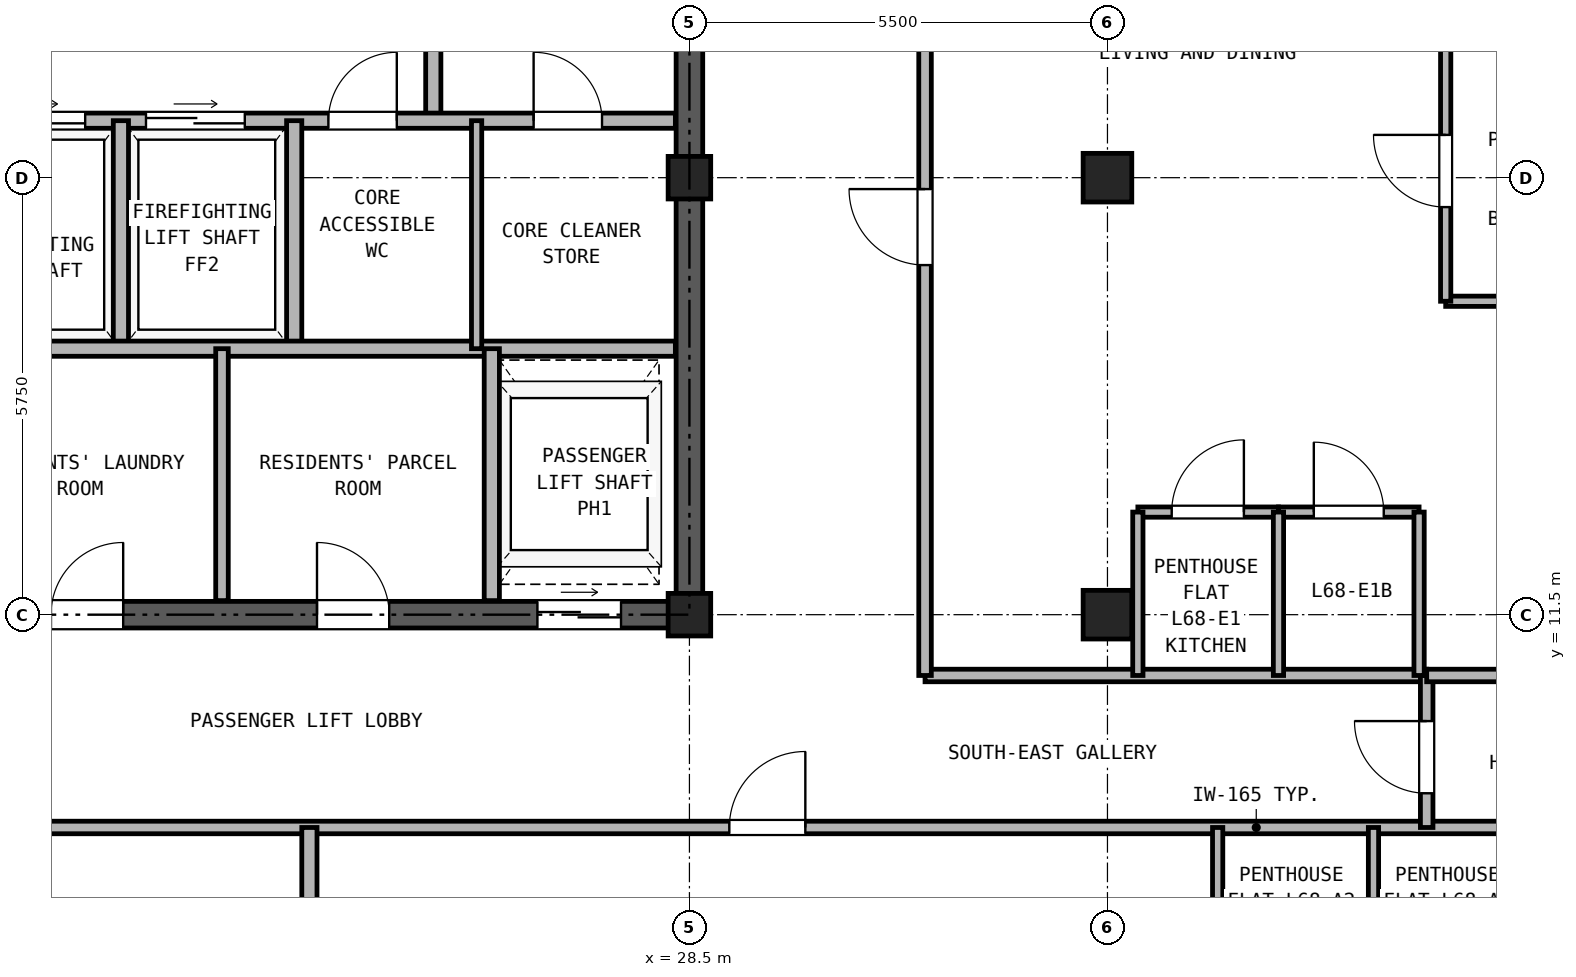
"""IFC4 building model, lengths in metres.
Left out: names, types, materials, properties, quantities, classifications, styles, units other than length and angle.
Written with IfcOpenShell. Run it as: python <this file> out.ifc"""

import sys

from ifc_helpers import new_model, si_unit, direction, frame, frame_2d, origin, origin_2d, place, context, subcontext, project, spatial, rectangle, hollow_rectangle, extrude, source, transform, mapped, element, fill, save


model = new_model("IFC4")
c1 = context("Model", 3, precision=1e-05, world=origin(), true_north=direction((0.0, 1.0)))
c2 = subcontext(c1, "Body", "Model", "MODEL_VIEW")
j1 = project(units=[si_unit("LENGTHUNIT", "METRE"), si_unit("PLANEANGLEUNIT", "RADIAN")], contexts=[c1])
p1 = place(None, origin())
s1 = spatial("IfcSite", under=j1, at=p1, CompositionType="ELEMENT")
p2 = place(p1, origin())
s2 = spatial("IfcBuilding", under=s1, at=p2, CompositionType="ELEMENT")
p3 = place(p2, frame((0.0, 0.0, 239.3)))
s3 = spatial("IfcBuildingStorey", under=s2, at=p3, CompositionType="ELEMENT", Elevation=239.3)
m1 = source(origin(), c2, "Body", "SweptSolid", [
    extrude(hollow_rectangle(XDim=0.56, YDim=0.56, WallThickness=0.03, at=origin_2d()), origin(), (0.0, 0.0, 1.0), 2.98),
])
for number, where, z_axis, x_axis in (
    (1, (28.5, 11.5, 0.0), (0.0, 0.0, 1.0), (1.0, 0.0, 0.0)),
    (2, (28.5, 17.25, 0.0), (0.0, 0.0, 1.0), (1.0, 0.0, 0.0)),
):
    element("IfcColumn", number, at=place(p3, frame(where, z_axis=z_axis, x_axis=x_axis)), inside=s3, PredefinedType="COLUMN", context=c2, shape_type="MappedRepresentation", body=[
        mapped(m1, transform((0.0, 0.0, 0.0), x_axis=(1.0, 0.0, 0.0), y_axis=(0.0, 1.0, 0.0), z_axis=(0.0, 0.0, 1.0), scale=1.0)),
    ])
m2 = source(origin(), c2, "Body", "SweptSolid", [
    extrude(hollow_rectangle(XDim=0.64, YDim=0.64, WallThickness=0.035, at=origin_2d()), origin(), (0.0, 0.0, 1.0), 2.98),
])
for number, where, z_axis, x_axis in (
    (3, (34.0, 11.5, 0.0), (0.0, 0.0, 1.0), (1.0, 0.0, 0.0)),
    (4, (34.0, 17.25, 0.0), (0.0, 0.0, 1.0), (1.0, 0.0, 0.0)),
):
    element("IfcColumn", number, at=place(p3, frame(where, z_axis=z_axis, x_axis=x_axis)), inside=s3, PredefinedType="COLUMN", context=c2, shape_type="MappedRepresentation", body=[
        mapped(m2, transform((0.0, 0.0, 0.0), x_axis=(1.0, 0.0, 0.0), y_axis=(0.0, 1.0, 0.0), z_axis=(0.0, 0.0, 1.0), scale=1.0)),
    ])
p4 = place(p3, frame((18.325, 11.5, 0.0), z_axis=(0.0, 0.0, 1.0), x_axis=(1.0, 0.0, 0.0)))
e5 = element("IfcWall", 5, at=p4, inside=s3, PredefinedType="SHEAR", context=c2, shape_type="SweptSolid", body=[
    extrude(rectangle(XDim=10.35, YDim=0.35, at=frame_2d((5.175, 0.0))), origin(), (0.0, 0.0, 1.0), 2.98),
])
p5 = place(p4, frame((1.775, 0.0, 0.0)))
e6 = element("IfcOpeningElement", 6, at=p5, cuts=e5, PredefinedType="OPENING", context=c2, shape_type="SweptSolid", body=[
    extrude(rectangle(XDim=0.95, YDim=2.15, at=frame_2d((0.475, 1.075))), frame((0.0, 0.185, 0.0), z_axis=(0.0, -1.0, 0.0), x_axis=(1.0, 0.0, 0.0)), (0.0, 0.0, 1.0), 0.37),
])
p6 = place(p4, frame((5.275, 0.0, 0.0)))
e7 = element("IfcOpeningElement", 7, at=p6, cuts=e5, PredefinedType="OPENING", context=c2, shape_type="SweptSolid", body=[
    extrude(rectangle(XDim=0.95, YDim=2.15, at=frame_2d((0.475, 1.075))), frame((0.0, 0.185, 0.0), z_axis=(0.0, -1.0, 0.0), x_axis=(1.0, 0.0, 0.0)), (0.0, 0.0, 1.0), 0.37),
])
p7 = place(p4, frame((8.175, 0.0, 0.0)))
e8 = element("IfcOpeningElement", 8, at=p7, cuts=e5, PredefinedType="OPENING", context=c2, shape_type="SweptSolid", body=[
    extrude(rectangle(XDim=1.1, YDim=2.25, at=frame_2d((0.55, 1.125))), frame((0.0, 0.185, 0.0), z_axis=(0.0, -1.0, 0.0), x_axis=(1.0, 0.0, 0.0)), (0.0, 0.0, 1.0), 0.37),
])
p8 = place(p3, frame((28.5, 11.675, 0.0), z_axis=(0.0, 0.0, 1.0), x_axis=(0.0, 1.0, 0.0)))
e9 = element("IfcWall", 9, at=p8, inside=s3, PredefinedType="SHEAR", context=c2, shape_type="SweptSolid", body=[
    extrude(rectangle(XDim=16.9, YDim=0.35, at=frame_2d((8.45, 0.0))), origin(), (0.0, 0.0, 1.0), 2.98),
])
p9 = place(p8, frame((7.475, 0.0, 0.0)))
e10 = element("IfcOpeningElement", 10, at=p9, cuts=e9, PredefinedType="OPENING", context=c2, shape_type="SweptSolid", body=[
    extrude(rectangle(XDim=1.15, YDim=2.2, at=frame_2d((0.575, 1.1))), frame((0.0, 0.185, 0.0), z_axis=(0.0, -1.0, 0.0), x_axis=(1.0, 0.0, 0.0)), (0.0, 0.0, 1.0), 0.37),
])
p10 = place(p3, frame((25.13, 18.0, 0.0), z_axis=(0.0, 0.0, 1.0), x_axis=(0.0, 1.0, 0.0)))
e11 = element("IfcWall", 11, at=p10, inside=s3, PredefinedType="PARTITIONING", context=c2, shape_type="SweptSolid", body=[
    extrude(rectangle(XDim=3.39, YDim=0.2, at=frame_2d((1.695, 0.0))), origin(), (0.0, 0.0, 1.0), 2.98),
])
p11 = place(p10, frame((1.1, 0.0, 0.0)))
e12 = element("IfcOpeningElement", 12, at=p11, cuts=e11, PredefinedType="OPENING", context=c2, shape_type="SweptSolid", body=[
    extrude(rectangle(XDim=1.15, YDim=2.2, at=frame_2d((0.575, 1.1))), frame((0.0, 0.11, 0.0), z_axis=(0.0, -1.0, 0.0), x_axis=(1.0, 0.0, 0.0)), (0.0, 0.0, 1.0), 0.22),
])
p12 = place(p3, frame((18.685, 18.0, 0.0), z_axis=(0.0, 0.0, 1.0), x_axis=(1.0, 0.0, 0.0)))
e13 = element("IfcWall", 13, at=p12, inside=s3, PredefinedType="PARTITIONING", context=c2, shape_type="SweptSolid", body=[
    extrude(rectangle(XDim=9.63, YDim=0.2, at=frame_2d((4.815, 0.0))), origin(), (0.0, 0.0, 1.0), 2.98),
])
p13 = place(p12, frame((0.565, 0.0, 0.0)))
e14 = element("IfcOpeningElement", 14, at=p13, cuts=e13, PredefinedType="OPENING", context=c2, shape_type="SweptSolid", body=[
    extrude(rectangle(XDim=1.3, YDim=2.3, at=frame_2d((0.65, 1.15))), frame((0.0, 0.11, 0.0), z_axis=(0.0, -1.0, 0.0), x_axis=(1.0, 0.0, 0.0)), (0.0, 0.0, 1.0), 0.22),
])
p14 = place(p12, frame((2.665, 0.0, 0.0)))
e15 = element("IfcOpeningElement", 15, at=p14, cuts=e13, PredefinedType="OPENING", context=c2, shape_type="SweptSolid", body=[
    extrude(rectangle(XDim=1.3, YDim=2.3, at=frame_2d((0.65, 1.15))), frame((0.0, 0.11, 0.0), z_axis=(0.0, -1.0, 0.0), x_axis=(1.0, 0.0, 0.0)), (0.0, 0.0, 1.0), 0.22),
])
p15 = place(p12, frame((5.065, 0.0, 0.0)))
e16 = element("IfcOpeningElement", 16, at=p15, cuts=e13, PredefinedType="OPENING", context=c2, shape_type="SweptSolid", body=[
    extrude(rectangle(XDim=0.9, YDim=2.05, at=frame_2d((0.45, 1.025))), frame((0.0, 0.11, 0.0), z_axis=(0.0, -1.0, 0.0), x_axis=(1.0, 0.0, 0.0)), (0.0, 0.0, 1.0), 0.22),
])
p16 = place(p12, frame((7.765, 0.0, 0.0)))
e17 = element("IfcOpeningElement", 17, at=p16, cuts=e13, PredefinedType="OPENING", context=c2, shape_type="SweptSolid", body=[
    extrude(rectangle(XDim=0.9, YDim=2.05, at=frame_2d((0.45, 1.025))), frame((0.0, 0.11, 0.0), z_axis=(0.0, -1.0, 0.0), x_axis=(1.0, 0.0, 0.0)), (0.0, 0.0, 1.0), 0.22),
])
for number, where, z_axis, x_axis in (
    (18, (21.02, 15.0, 0.0), (0.0, 0.0, 1.0), (0.0, 1.0, 0.0)),
    (19, (23.3, 15.0, 0.0), (0.0, 0.0, 1.0), (0.0, 1.0, 0.0)),
):
    element("IfcWall", number, at=place(p3, frame(where, z_axis=z_axis, x_axis=x_axis)), inside=s3, PredefinedType="PARTITIONING", context=c2, shape_type="SweptSolid", body=[
        extrude(rectangle(XDim=3.0, YDim=0.2, at=frame_2d((1.5, 0.0))), origin(), (0.0, 0.0, 1.0), 2.98),
    ])
p17 = place(p3, frame((18.685, 15.0, 0.0), z_axis=(0.0, 0.0, 1.0), x_axis=(1.0, 0.0, 0.0)))
e20 = element("IfcWall", 20, at=p17, inside=s3, PredefinedType="PARTITIONING", context=c2, shape_type="SweptSolid", body=[
    extrude(rectangle(XDim=9.63, YDim=0.2, at=frame_2d((4.815, 0.0))), origin(), (0.0, 0.0, 1.0), 2.98),
])
p18 = place(p3, frame((25.7, 15.0, 0.0), z_axis=(0.0, 0.0, 1.0), x_axis=(0.0, 1.0, 0.0)))
e21 = element("IfcWall", 21, at=p18, inside=s3, PredefinedType="PARTITIONING", context=c2, shape_type="SweptSolid", body=[
    extrude(rectangle(XDim=3.0, YDim=0.135, at=frame_2d((1.5, 0.0))), origin(), (0.0, 0.0, 1.0), 2.98),
])
p19 = place(p3, frame((22.35, 11.685, 0.0), z_axis=(0.0, 0.0, 1.0), x_axis=(0.0, 1.0, 0.0)))
e22 = element("IfcWall", 22, at=p19, inside=s3, PredefinedType="PARTITIONING", context=c2, shape_type="SweptSolid", body=[
    extrude(rectangle(XDim=3.315, YDim=0.165, at=frame_2d((1.657, 0.0))), origin(), (0.0, 0.0, 1.0), 2.98),
])
p20 = place(p3, frame((25.9, 11.685, 0.0), z_axis=(0.0, 0.0, 1.0), x_axis=(0.0, 1.0, 0.0)))
e23 = element("IfcWall", 23, at=p20, inside=s3, PredefinedType="PARTITIONING", context=c2, shape_type="SweptSolid", body=[
    extrude(rectangle(XDim=3.315, YDim=0.2, at=frame_2d((1.657, 0.0))), origin(), (0.0, 0.0, 1.0), 2.98),
])
p21 = place(p3, frame((5.36, 8.7, 0.0), z_axis=(0.0, 0.0, 1.0), x_axis=(1.0, 0.0, 0.0)))
e24 = element("IfcWall", 24, at=p21, inside=s3, PredefinedType="PARTITIONING", context=c2, shape_type="SweptSolid", body=[
    extrude(rectangle(XDim=36.28, YDim=0.165, at=frame_2d((18.14, 0.0))), origin(), (0.0, 0.0, 1.0), 2.655),
])
p22 = place(p21, frame((11.615, 0.0, 0.0)))
e25 = element("IfcOpeningElement", 25, at=p22, cuts=e24, PredefinedType="OPENING", context=c2, shape_type="SweptSolid", body=[
    extrude(rectangle(XDim=1.0, YDim=2.15, at=frame_2d((0.5, 1.075))), frame((0.0, 0.093, 0.0), z_axis=(0.0, -1.0, 0.0), x_axis=(1.0, 0.0, 0.0)), (0.0, 0.0, 1.0), 0.185),
])
p23 = place(p21, frame((23.665, 0.0, 0.0)))
e26 = element("IfcOpeningElement", 26, at=p23, cuts=e24, PredefinedType="OPENING", context=c2, shape_type="SweptSolid", body=[
    extrude(rectangle(XDim=1.0, YDim=2.15, at=frame_2d((0.5, 1.075))), frame((0.0, 0.093, 0.0), z_axis=(0.0, -1.0, 0.0), x_axis=(1.0, 0.0, 0.0)), (0.0, 0.0, 1.0), 0.185),
])
p24 = place(p3, frame((31.6, 10.7, 0.0), z_axis=(0.0, 0.0, 1.0), x_axis=(1.0, 0.0, 0.0)))
e27 = element("IfcWall", 27, at=p24, inside=s3, PredefinedType="PARTITIONING", context=c2, shape_type="SweptSolid", body=[
    extrude(rectangle(XDim=6.6, YDim=0.165, at=frame_2d((3.3, 0.0))), origin(), (0.0, 0.0, 1.0), 2.98),
])
p25 = place(p3, frame((38.2, 8.7, 0.0), z_axis=(0.0, 0.0, 1.0), x_axis=(0.0, 1.0, 0.0)))
e28 = element("IfcWall", 28, at=p25, inside=s3, PredefinedType="PARTITIONING", context=c2, shape_type="SweptSolid", body=[
    extrude(rectangle(XDim=2.0, YDim=0.165, at=frame_2d((1.0, 0.0))), origin(), (0.0, 0.0, 1.0), 2.98),
])
p26 = place(p25, frame((0.45, 0.0, 0.0)))
e29 = element("IfcOpeningElement", 29, at=p26, cuts=e28, PredefinedType="OPENING", context=c2, shape_type="SweptSolid", body=[
    extrude(rectangle(XDim=0.95, YDim=2.15, at=frame_2d((0.475, 1.075))), frame((0.0, 0.093, 0.0), z_axis=(0.0, -1.0, 0.0), x_axis=(1.0, 0.0, 0.0)), (0.0, 0.0, 1.0), 0.185),
])
p27 = place(p3, frame((31.6, 10.7, 0.0), z_axis=(0.0, 0.0, 1.0), x_axis=(0.0, 1.0, 0.0)))
e30 = element("IfcWall", 30, at=p27, inside=s3, PredefinedType="PARTITIONING", context=c2, shape_type="SweptSolid", body=[
    extrude(rectangle(XDim=24.44, YDim=0.165, at=frame_2d((12.22, 0.0))), origin(), (0.0, 0.0, 1.0), 2.98),
])
p28 = place(p27, frame((5.4, 0.0, 0.0)))
e31 = element("IfcOpeningElement", 31, at=p28, cuts=e30, PredefinedType="OPENING", context=c2, shape_type="SweptSolid", body=[
    extrude(rectangle(XDim=1.0, YDim=2.15, at=frame_2d((0.5, 1.075))), frame((0.0, 0.093, 0.0), z_axis=(0.0, -1.0, 0.0), x_axis=(1.0, 0.0, 0.0)), (0.0, 0.0, 1.0), 0.185),
])
p29 = place(p27, frame((15.7, 0.0, 0.0)))
e32 = element("IfcOpeningElement", 32, at=p29, cuts=e30, PredefinedType="OPENING", context=c2, shape_type="SweptSolid", body=[
    extrude(rectangle(XDim=1.0, YDim=2.15, at=frame_2d((0.5, 1.075))), frame((0.0, 0.093, 0.0), z_axis=(0.0, -1.0, 0.0), x_axis=(1.0, 0.0, 0.0)), (0.0, 0.0, 1.0), 0.185),
])
p30 = place(p3, frame((23.5, 0.16, 0.0), z_axis=(0.0, 0.0, 1.0), x_axis=(0.0, 1.0, 0.0)))
e33 = element("IfcWall", 33, at=p30, inside=s3, PredefinedType="PARTITIONING", context=c2, shape_type="SweptSolid", body=[
    extrude(rectangle(XDim=8.54, YDim=0.2, at=frame_2d((4.27, 0.0))), origin(), (0.0, 0.0, 1.0), 2.98),
])
for number, where, z_axis, x_axis in (
    (34, (35.45, 6.55, 0.0), (0.0, 0.0, 1.0), (0.0, 1.0, 0.0)),
    (35, (37.5, 6.55, 0.0), (0.0, 0.0, 1.0), (0.0, 1.0, 0.0)),
):
    element("IfcWall", number, at=place(p3, frame(where, z_axis=z_axis, x_axis=x_axis)), inside=s3, PredefinedType="PARTITIONING", context=c2, shape_type="SweptSolid", body=[
        extrude(rectangle(XDim=2.15, YDim=0.135, at=frame_2d((1.075, 0.0))), origin(), (0.0, 0.0, 1.0), 2.98),
    ])
p31 = place(p3, frame((38.2, 10.7, 0.0), z_axis=(0.0, 0.0, 1.0), x_axis=(1.0, 0.0, 0.0)))
e36 = element("IfcWall", 36, at=p31, inside=s3, PredefinedType="PARTITIONING", context=c2, shape_type="SweptSolid", body=[
    extrude(rectangle(XDim=3.44, YDim=0.165, at=frame_2d((1.72, 0.0))), origin(), (0.0, 0.0, 1.0), 2.98),
])
p32 = place(p3, frame((34.4, 12.85, 0.0), z_axis=(0.0, 0.0, 1.0), x_axis=(1.0, 0.0, 0.0)))
e37 = element("IfcWall", 37, at=p32, inside=s3, PredefinedType="PARTITIONING", context=c2, shape_type="SweptSolid", body=[
    extrude(rectangle(XDim=1.85, YDim=0.135, at=frame_2d((0.925, 0.0))), origin(), (0.0, 0.0, 1.0), 2.98),
])
p33 = place(p32, frame((0.445, 0.0, 0.0)))
e38 = element("IfcOpeningElement", 38, at=p33, cuts=e37, PredefinedType="OPENING", context=c2, shape_type="SweptSolid", body=[
    extrude(rectangle(XDim=0.95, YDim=2.15, at=frame_2d((0.475, 1.075))), frame((0.0, 0.077, 0.0), z_axis=(0.0, -1.0, 0.0), x_axis=(1.0, 0.0, 0.0)), (0.0, 0.0, 1.0), 0.155),
])
p34 = place(p3, frame((36.25, 12.85, 0.0), z_axis=(0.0, 0.0, 1.0), x_axis=(1.0, 0.0, 0.0)))
e39 = element("IfcWall", 39, at=p34, inside=s3, PredefinedType="PARTITIONING", context=c2, shape_type="SweptSolid", body=[
    extrude(rectangle(XDim=1.85, YDim=0.135, at=frame_2d((0.925, 0.0))), origin(), (0.0, 0.0, 1.0), 2.98),
])
p35 = place(p34, frame((0.465, 0.0, 0.0)))
e40 = element("IfcOpeningElement", 40, at=p35, cuts=e39, PredefinedType="OPENING", context=c2, shape_type="SweptSolid", body=[
    extrude(rectangle(XDim=0.92, YDim=2.1, at=frame_2d((0.46, 1.05))), frame((0.0, 0.077, 0.0), z_axis=(0.0, -1.0, 0.0), x_axis=(1.0, 0.0, 0.0)), (0.0, 0.0, 1.0), 0.155),
])
for number, where, z_axis, x_axis in (
    (41, (34.4, 10.7, 0.0), (0.0, 0.0, 1.0), (0.0, 1.0, 0.0)),
    (42, (36.25, 10.7, 0.0), (0.0, 0.0, 1.0), (0.0, 1.0, 0.0)),
    (43, (38.1, 10.7, 0.0), (0.0, 0.0, 1.0), (0.0, 1.0, 0.0)),
):
    element("IfcWall", number, at=place(p3, frame(where, z_axis=z_axis, x_axis=x_axis)), inside=s3, PredefinedType="PARTITIONING", context=c2, shape_type="SweptSolid", body=[
        extrude(rectangle(XDim=2.15, YDim=0.135, at=frame_2d((1.075, 0.0))), origin(), (0.0, 0.0, 1.0), 2.98),
    ])
p36 = place(p3, frame((38.45, 15.624, 0.0), z_axis=(0.0, 0.0, 1.0), x_axis=(1.0, 0.0, 0.0)))
e44 = element("IfcWall", 44, at=p36, inside=s3, PredefinedType="PARTITIONING", context=c2, shape_type="SweptSolid", body=[
    extrude(rectangle(XDim=3.19, YDim=0.135, at=frame_2d((1.595, 0.0))), origin(), (0.0, 0.0, 1.0), 2.98),
])
p37 = place(p3, frame((38.45, 15.624, 0.0), z_axis=(0.0, 0.0, 1.0), x_axis=(0.0, 1.0, 0.0)))
e45 = element("IfcWall", 45, at=p37, inside=s3, PredefinedType="PARTITIONING", context=c2, shape_type="SweptSolid", body=[
    extrude(rectangle(XDim=3.438, YDim=0.135, at=frame_2d((1.719, 0.0))), origin(), (0.0, 0.0, 1.0), 2.98),
])
p38 = place(p37, frame((1.239, 0.0, 0.0)))
e46 = element("IfcOpeningElement", 46, at=p38, cuts=e45, PredefinedType="OPENING", context=c2, shape_type="SweptSolid", body=[
    extrude(rectangle(XDim=0.95, YDim=2.15, at=frame_2d((0.475, 1.075))), frame((0.0, 0.077, 0.0), z_axis=(0.0, -1.0, 0.0), x_axis=(1.0, 0.0, 0.0)), (0.0, 0.0, 1.0), 0.155),
])
p39 = place(p13, origin())
e47 = element("IfcDoor", 47, at=p39, inside=s3, OperationType="DOUBLE_DOOR_SLIDING", PredefinedType="DOOR", context=c2, shape_type="SweptSolid", body=[
    extrude(rectangle(XDim=1.3, YDim=2.3, at=frame_2d((0.65, 1.15))), frame((0.0, 0.025, 0.0), z_axis=(0.0, -1.0, 0.0), x_axis=(1.0, 0.0, 0.0)), (0.0, 0.0, 1.0), 0.05),
])
fill(e14, e47)
p40 = place(p14, origin())
e48 = element("IfcDoor", 48, at=p40, inside=s3, OperationType="DOUBLE_DOOR_SLIDING", PredefinedType="DOOR", context=c2, shape_type="SweptSolid", body=[
    extrude(rectangle(XDim=1.3, YDim=2.3, at=frame_2d((0.65, 1.15))), frame((0.0, 0.025, 0.0), z_axis=(0.0, -1.0, 0.0), x_axis=(1.0, 0.0, 0.0)), (0.0, 0.0, 1.0), 0.05),
])
fill(e15, e48)
p41 = place(p15, frame((0.9, 0.0, 0.0), z_axis=(0.0, 0.0, 1.0), x_axis=(-1.0, 0.0, 0.0)))
e49 = element("IfcDoor", 49, at=p41, inside=s3, OperationType="SINGLE_SWING_RIGHT", PredefinedType="DOOR", context=c2, shape_type="SweptSolid", body=[
    extrude(rectangle(XDim=0.9, YDim=2.05, at=frame_2d((0.45, 1.025))), frame((0.0, 0.025, 0.0), z_axis=(0.0, -1.0, 0.0), x_axis=(1.0, 0.0, 0.0)), (0.0, 0.0, 1.0), 0.05),
])
fill(e16, e49)
p42 = place(p16, frame((0.9, 0.0, 0.0), z_axis=(0.0, 0.0, 1.0), x_axis=(-1.0, 0.0, 0.0)))
e50 = element("IfcDoor", 50, at=p42, inside=s3, OperationType="SINGLE_SWING_LEFT", PredefinedType="DOOR", context=c2, shape_type="SweptSolid", body=[
    extrude(rectangle(XDim=0.9, YDim=2.05, at=frame_2d((0.45, 1.025))), frame((0.0, 0.025, 0.0), z_axis=(0.0, -1.0, 0.0), x_axis=(1.0, 0.0, 0.0)), (0.0, 0.0, 1.0), 0.05),
])
fill(e17, e50)
p43 = place(p5, frame((0.95, 0.0, 0.0), z_axis=(0.0, 0.0, 1.0), x_axis=(-1.0, 0.0, 0.0)))
e51 = element("IfcDoor", 51, at=p43, inside=s3, OperationType="SINGLE_SWING_RIGHT", PredefinedType="DOOR", context=c2, shape_type="SweptSolid", body=[
    extrude(rectangle(XDim=0.95, YDim=2.15, at=frame_2d((0.475, 1.075))), frame((0.0, 0.025, 0.0), z_axis=(0.0, -1.0, 0.0), x_axis=(1.0, 0.0, 0.0)), (0.0, 0.0, 1.0), 0.05),
])
fill(e6, e51)
p44 = place(p6, frame((0.95, 0.0, 0.0), z_axis=(0.0, 0.0, 1.0), x_axis=(-1.0, 0.0, 0.0)))
e52 = element("IfcDoor", 52, at=p44, inside=s3, OperationType="SINGLE_SWING_LEFT", PredefinedType="DOOR", context=c2, shape_type="SweptSolid", body=[
    extrude(rectangle(XDim=0.95, YDim=2.15, at=frame_2d((0.475, 1.075))), frame((0.0, 0.025, 0.0), z_axis=(0.0, -1.0, 0.0), x_axis=(1.0, 0.0, 0.0)), (0.0, 0.0, 1.0), 0.05),
])
fill(e7, e52)
p45 = place(p7, frame((1.1, 0.0, 0.0), z_axis=(0.0, 0.0, 1.0), x_axis=(-1.0, 0.0, 0.0)))
e53 = element("IfcDoor", 53, at=p45, inside=s3, OperationType="DOUBLE_DOOR_SLIDING", PredefinedType="DOOR", context=c2, shape_type="SweptSolid", body=[
    extrude(rectangle(XDim=1.1, YDim=2.25, at=frame_2d((0.55, 1.125))), frame((0.0, 0.025, 0.0), z_axis=(0.0, -1.0, 0.0), x_axis=(1.0, 0.0, 0.0)), (0.0, 0.0, 1.0), 0.05),
])
fill(e8, e53)
p46 = place(p23, frame((1.0, 0.0, 0.0), z_axis=(0.0, 0.0, 1.0), x_axis=(-1.0, 0.0, 0.0)))
e54 = element("IfcDoor", 54, at=p46, inside=s3, OperationType="SINGLE_SWING_RIGHT", PredefinedType="DOOR", context=c2, shape_type="SweptSolid", body=[
    extrude(rectangle(XDim=1.0, YDim=2.15, at=frame_2d((0.5, 1.075))), frame((0.0, 0.025, 0.0), z_axis=(0.0, -1.0, 0.0), x_axis=(1.0, 0.0, 0.0)), (0.0, 0.0, 1.0), 0.05),
])
fill(e26, e54)
p47 = place(p26, origin())
e55 = element("IfcDoor", 55, at=p47, inside=s3, OperationType="SINGLE_SWING_RIGHT", PredefinedType="DOOR", context=c2, shape_type="SweptSolid", body=[
    extrude(rectangle(XDim=0.95, YDim=2.15, at=frame_2d((0.475, 1.075))), frame((0.0, 0.025, 0.0), z_axis=(0.0, -1.0, 0.0), x_axis=(1.0, 0.0, 0.0)), (0.0, 0.0, 1.0), 0.05),
])
fill(e29, e55)
p48 = place(p33, origin())
e56 = element("IfcDoor", 56, at=p48, inside=s3, OperationType="SINGLE_SWING_RIGHT", PredefinedType="DOOR", context=c2, shape_type="SweptSolid", body=[
    extrude(rectangle(XDim=0.95, YDim=2.15, at=frame_2d((0.475, 1.075))), frame((0.0, 0.025, 0.0), z_axis=(0.0, -1.0, 0.0), x_axis=(1.0, 0.0, 0.0)), (0.0, 0.0, 1.0), 0.05),
])
fill(e38, e56)
p49 = place(p35, origin())
e57 = element("IfcDoor", 57, at=p49, inside=s3, OperationType="SINGLE_SWING_LEFT", PredefinedType="DOOR", context=c2, shape_type="SweptSolid", body=[
    extrude(rectangle(XDim=0.92, YDim=2.1, at=frame_2d((0.46, 1.05))), frame((0.0, 0.025, 0.0), z_axis=(0.0, -1.0, 0.0), x_axis=(1.0, 0.0, 0.0)), (0.0, 0.0, 1.0), 0.05),
])
fill(e40, e57)
p50 = place(p38, frame((0.95, 0.0, 0.0), z_axis=(0.0, 0.0, 1.0), x_axis=(-1.0, 0.0, 0.0)))
e58 = element("IfcDoor", 58, at=p50, inside=s3, OperationType="SINGLE_SWING_RIGHT", PredefinedType="DOOR", context=c2, shape_type="SweptSolid", body=[
    extrude(rectangle(XDim=0.95, YDim=2.15, at=frame_2d((0.475, 1.075))), frame((0.0, 0.025, 0.0), z_axis=(0.0, -1.0, 0.0), x_axis=(1.0, 0.0, 0.0)), (0.0, 0.0, 1.0), 0.05),
])
fill(e46, e58)
p51 = place(p28, frame((1.0, 0.0, 0.0), z_axis=(0.0, 0.0, 1.0), x_axis=(-1.0, 0.0, 0.0)))
e59 = element("IfcDoor", 59, at=p51, inside=s3, OperationType="SINGLE_SWING_RIGHT", PredefinedType="DOOR", context=c2, shape_type="SweptSolid", body=[
    extrude(rectangle(XDim=1.0, YDim=2.15, at=frame_2d((0.5, 1.075))), frame((0.0, 0.025, 0.0), z_axis=(0.0, -1.0, 0.0), x_axis=(1.0, 0.0, 0.0)), (0.0, 0.0, 1.0), 0.05),
])
fill(e31, e59)
save(model, sys.argv[1])
